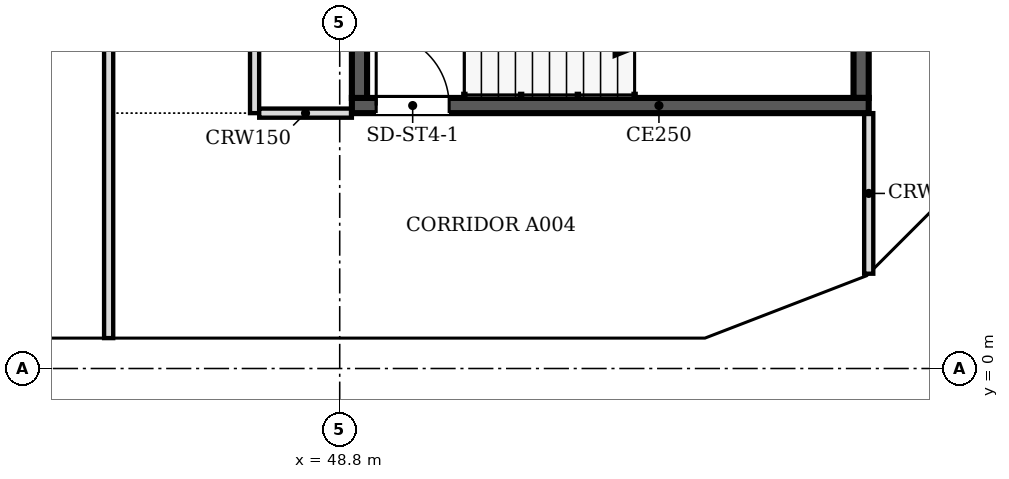
"""IFC4 building model, lengths in metres.
Left out: names, types, materials, properties, quantities, classifications, styles, units other than length and angle.
Written with IfcOpenShell. Run it as: python <this file> out.ifc"""

import sys

from ifc_helpers import new_model, si_unit, direction, frame, frame_2d, origin, place, context, subcontext, project, spatial, polyline, rectangle, outline, extrude, faceted_brep, source, transform, mapped, element, fill, save


model = new_model("IFC4")
c1 = context("Model", 3, precision=1e-05, world=origin(), true_north=direction((0.0, 1.0)))
c2 = subcontext(c1, "Body", "Model", "MODEL_VIEW")
j1 = project(units=[si_unit("LENGTHUNIT", "METRE"), si_unit("PLANEANGLEUNIT", "RADIAN")], contexts=[c1])
p1 = place(None, origin())
s1 = spatial("IfcSite", under=j1, at=p1, CompositionType="ELEMENT")
p2 = place(p1, origin())
s2 = spatial("IfcBuilding", under=s1, at=p2, CompositionType="ELEMENT")
p3 = place(p2, frame((0.0, 0.0, 197.9)))
s3 = spatial("IfcBuildingStorey", under=s2, at=p3, CompositionType="ELEMENT", Elevation=197.9)
m1 = source(origin(), c2, "Body", "SweptSolid", [
    extrude(outline(polyline([(6.1, 0.0), (3.05, 3.8), (0.0, 0.0), (6.1, 0.0)])), frame((0.0, 0.25, 0.0), z_axis=(0.0, -1.0, 0.0), x_axis=(1.0, 0.0, 0.0)), (0.0, 0.0, 1.0), 0.5),
])
p4 = place(p3, frame((39.65, 0.25, 0.0), z_axis=(0.0, 0.0, 1.0), x_axis=(1.0, 0.0, 0.0)))
e1 = element("IfcWall", 1, at=p4, inside=s3, PredefinedType="SOLIDWALL", context=c2, shape_type="MappedRepresentation", body=[
    mapped(m1, transform((0.0, 0.0, 0.0), scale=1.0)),
])
m2 = source(origin(), c2, "Body", "SweptSolid", [
    extrude(outline(polyline([(5.579, 0.25), (3.05, 3.401), (0.521, 0.25), (5.579, 0.25)])), frame((0.0, 0.26, 0.0), z_axis=(0.0, -1.0, 0.0), x_axis=(1.0, 0.0, 0.0)), (0.0, 0.0, 1.0), 0.52),
])
p5 = place(p4, origin())
e2 = element("IfcOpeningElement", 2, at=p5, cuts=e1, PredefinedType="OPENING", context=c2, shape_type="MappedRepresentation", body=[
    mapped(m2, transform((0.0, 0.0, 0.0), scale=1.0)),
])
p6 = place(p3, frame((45.75, 0.25, 0.0), z_axis=(0.0, 0.0, 1.0), x_axis=(1.0, 0.0, 0.0)))
e3 = element("IfcWall", 3, at=p6, inside=s3, PredefinedType="SOLIDWALL", context=c2, shape_type="MappedRepresentation", body=[
    mapped(m1, transform((0.0, 0.0, 0.0), scale=1.0)),
])
p7 = place(p6, origin())
e4 = element("IfcOpeningElement", 4, at=p7, cuts=e3, PredefinedType="OPENING", context=c2, shape_type="MappedRepresentation", body=[
    mapped(m2, transform((0.0, 0.0, 0.0), scale=1.0)),
])
m3 = source(origin(), c2, "Body", "Brep", [
    faceted_brep([(3.05, -0.25, 3.74), (3.003, -0.25, 3.8), (0.0, -0.25, 0.0), (3.05, -0.25, 0.0), (0.0, 0.25, 0.0), (2.957, 0.25, 3.741), (2.957, 0.25, 0.0), (3.003, 0.0, 3.8)], [[[0, 1, 2, 3]], [[4, 5, 6]], [[7, 1, 0]], [[5, 4, 2, 1, 7]], [[4, 6, 3, 2]], [[3, 6, 5, 7, 0]]]),
])
p8 = place(p3, frame((51.85, 0.25, 0.0), z_axis=(0.0, 0.0, 1.0), x_axis=(1.0, 0.0, 0.0)))
e5 = element("IfcWall", 5, at=p8, inside=s3, PredefinedType="SOLIDWALL", context=c2, shape_type="MappedRepresentation", body=[
    mapped(m3, transform((0.0, 0.0, 0.0), scale=1.0)),
])
m4 = source(origin(), c2, "Body", "SweptSolid", [
    extrude(outline(polyline([(2.803, 3.144), (0.516, 0.25), (2.803, 0.25), (2.803, 3.144)])), frame((0.0, 0.26, 0.0), z_axis=(0.0, -1.0, 0.0), x_axis=(1.0, 0.0, 0.0)), (0.0, 0.0, 1.0), 0.52),
])
p9 = place(p8, origin())
e6 = element("IfcOpeningElement", 6, at=p9, cuts=e5, PredefinedType="OPENING", context=c2, shape_type="MappedRepresentation", body=[
    mapped(m4, transform((0.0, 0.0, 0.0), scale=1.0)),
])
m5 = source(origin(), c2, "Body", "Brep", [
    faceted_brep([(2.997, -0.25, 0.0), (0.047, -0.25, 3.8), (0.0, -0.25, 3.741), (0.0, -0.25, 0.0), (0.093, 0.25, 3.74), (2.944, 0.25, 0.068), (2.944, 0.25, 0.0), (0.093, 0.25, 0.0), (0.047, 0.0, 3.8), (2.997, 0.0, 0.0)], [[[0, 1, 2, 3]], [[4, 5, 6, 7]], [[5, 4, 8, 1, 0, 9]], [[2, 1, 8]], [[7, 6, 9, 0, 3]], [[7, 3, 2, 8, 4]], [[9, 6, 5]]]),
])
p10 = place(p3, frame((54.81, 0.233, 0.0), z_axis=(0.0, 0.0, 1.0), x_axis=(0.932990326376, 0.359901446078, 0.0)))
e7 = element("IfcWall", 7, at=p10, inside=s3, PredefinedType="SOLIDWALL", context=c2, shape_type="MappedRepresentation", body=[
    mapped(m5, transform((0.0, 0.0, 0.0), scale=1.0)),
])
m6 = source(origin(), c2, "Body", "SweptSolid", [
    extrude(outline(polyline([(2.487, 0.25), (0.247, 3.135), (0.247, 0.25), (2.487, 0.25)])), frame((0.0, 0.26, 0.0), z_axis=(0.0, -1.0, 0.0), x_axis=(1.0, 0.0, 0.0)), (0.0, 0.0, 1.0), 0.52),
])
p11 = place(p10, origin())
e8 = element("IfcOpeningElement", 8, at=p11, cuts=e7, PredefinedType="OPENING", context=c2, shape_type="MappedRepresentation", body=[
    mapped(m6, transform((0.0, 0.0, 0.0), scale=1.0)),
])
m7 = source(origin(), c2, "Body", "Brep", [
    faceted_brep([(2.997, -0.25, 3.732), (2.944, -0.25, 3.8), (0.0, -0.25, 0.0), (2.997, -0.25, 0.0), (0.053, 0.25, 0.068), (2.891, 0.25, 3.732), (2.891, 0.25, 0.0), (0.053, 0.25, 0.0), (2.944, 0.0, 3.8), (0.0, 0.0, 0.0)], [[[0, 1, 2, 3]], [[4, 5, 6, 7]], [[8, 1, 0]], [[5, 4, 9, 2, 1, 8]], [[7, 6, 3, 2, 9]], [[7, 9, 4]], [[3, 6, 5, 8, 0]]]),
])
p12 = place(p3, frame((57.606, 1.312, 0.0), z_axis=(0.0, 0.0, 1.0), x_axis=(0.707147509625, 0.707066050402, 0.0)))
e9 = element("IfcWall", 9, at=p12, inside=s3, PredefinedType="SOLIDWALL", context=c2, shape_type="MappedRepresentation", body=[
    mapped(m7, transform((0.0, 0.0, 0.0), scale=1.0)),
])
m8 = source(origin(), c2, "Body", "SweptSolid", [
    extrude(outline(polyline([(2.744, 3.134), (0.51, 0.25), (2.744, 0.25), (2.744, 3.134)])), frame((0.0, 0.26, 0.0), z_axis=(0.0, -1.0, 0.0), x_axis=(1.0, 0.0, 0.0)), (0.0, 0.0, 1.0), 0.52),
])
p13 = place(p12, origin())
e10 = element("IfcOpeningElement", 10, at=p13, cuts=e9, PredefinedType="OPENING", context=c2, shape_type="MappedRepresentation", body=[
    mapped(m8, transform((0.0, 0.0, 0.0), scale=1.0)),
])
p14 = place(p2, frame((0.0, 0.0, 201.7)))
s4 = spatial("IfcBuildingStorey", under=s2, at=p14, CompositionType="ELEMENT", Elevation=201.7)
m9 = source(origin(), c2, "Body", "SweptSolid", [
    extrude(outline(polyline([(3.05, 0.0), (6.1, 3.8), (3.05, 7.6), (0.0, 3.8), (3.05, 0.0)])), frame((0.0, 0.25, 0.0), z_axis=(0.0, -1.0, 0.0), x_axis=(1.0, 0.0, 0.0)), (0.0, 0.0, 1.0), 0.5),
])
p15 = place(p14, frame((42.7, 0.25, -3.8), z_axis=(0.0, 0.0, 1.0), x_axis=(1.0, 0.0, 0.0)))
e11 = element("IfcWall", 11, at=p15, inside=s4, PredefinedType="SOLIDWALL", context=c2, shape_type="MappedRepresentation", body=[
    mapped(m9, transform((0.0, 0.0, 0.0), scale=1.0)),
])
m10 = source(origin(), c2, "Body", "SweptSolid", [
    extrude(outline(polyline([(3.05, 0.399), (5.78, 3.8), (3.05, 7.201), (0.321, 3.8), (3.05, 0.399)])), frame((0.0, 0.26, 0.0), z_axis=(0.0, -1.0, 0.0), x_axis=(1.0, 0.0, 0.0)), (0.0, 0.0, 1.0), 0.52),
])
p16 = place(p15, origin())
e12 = element("IfcOpeningElement", 12, at=p16, cuts=e11, PredefinedType="OPENING", context=c2, shape_type="MappedRepresentation", body=[
    mapped(m10, transform((0.0, 0.0, 0.0), scale=1.0)),
])
m11 = source(origin(), c2, "Body", "Brep", [
    faceted_brep([(3.05, -0.25, 0.0), (6.053, -0.25, 3.8), (3.05, -0.25, 7.6), (0.0, -0.25, 3.8), (0.0, 0.25, 3.8), (3.05, 0.25, 7.6), (6.007, 0.25, 3.859), (6.007, 0.25, 3.741), (3.05, 0.25, 0.0), (6.053, 0.0, 3.8)], [[[0, 1, 2, 3]], [[4, 5, 6, 7, 8]], [[8, 7, 9, 1, 0]], [[6, 5, 2, 1, 9]], [[5, 4, 3, 2]], [[4, 8, 0, 3]], [[9, 7, 6]]]),
])
p17 = place(p14, frame((48.8, 0.25, -3.8), z_axis=(0.0, 0.0, 1.0), x_axis=(1.0, 0.0, 0.0)))
e13 = element("IfcWall", 13, at=p17, inside=s4, PredefinedType="SOLIDWALL", context=c2, shape_type="MappedRepresentation", body=[
    mapped(m11, transform((0.0, 0.0, 0.0), scale=1.0)),
])
m12 = source(origin(), c2, "Body", "SweptSolid", [
    extrude(outline(polyline([(3.049, 0.401), (5.735, 3.8), (3.049, 7.199), (0.321, 3.8), (3.049, 0.401)])), frame((0.0, 0.26, 0.0), z_axis=(0.0, -1.0, 0.0), x_axis=(1.0, 0.0, 0.0)), (0.0, 0.0, 1.0), 0.52),
])
p18 = place(p17, origin())
e14 = element("IfcOpeningElement", 14, at=p18, cuts=e13, PredefinedType="OPENING", context=c2, shape_type="MappedRepresentation", body=[
    mapped(m12, transform((0.0, 0.0, 0.0), scale=1.0)),
])
m13 = source(origin(), c2, "Body", "Brep", [
    faceted_brep([(2.95, -0.25, 0.0), (3.003, -0.25, 0.068), (3.003, -0.25, 7.532), (2.95, -0.25, 7.6), (0.0, -0.25, 3.8), (0.047, 0.25, 3.86), (2.898, 0.25, 7.532), (2.898, 0.25, 0.068), (0.047, 0.25, 3.74), (2.95, 0.0, 0.0), (2.95, 0.0, 7.6), (0.0, 0.0, 3.8)], [[[0, 1, 2, 3, 4]], [[5, 6, 7, 8]], [[1, 0, 9]], [[10, 3, 2]], [[6, 5, 11, 4, 3, 10]], [[8, 7, 9, 0, 4, 11]], [[8, 11, 5]], [[1, 9, 7, 6, 10, 2]]]),
])
p19 = place(p14, frame((54.854, 0.25, -3.8), z_axis=(0.0, 0.0, 1.0), x_axis=(0.932970071518, 0.359953949349, 0.0)))
e15 = element("IfcWall", 15, at=p19, inside=s4, PredefinedType="SOLIDWALL", context=c2, shape_type="MappedRepresentation", body=[
    mapped(m13, transform((0.0, 0.0, 0.0), scale=1.0)),
])
m14 = source(origin(), c2, "Body", "SweptSolid", [
    extrude(outline(polyline([(2.75, 6.935), (0.316, 3.8), (2.75, 0.665), (2.75, 6.935)])), frame((0.0, 0.26, 0.0), z_axis=(0.0, -1.0, 0.0), x_axis=(1.0, 0.0, 0.0)), (0.0, 0.0, 1.0), 0.52),
])
p20 = place(p19, origin())
e16 = element("IfcOpeningElement", 16, at=p20, cuts=e15, PredefinedType="OPENING", context=c2, shape_type="MappedRepresentation", body=[
    mapped(m14, transform((0.0, 0.0, 0.0), scale=1.0)),
])
m15 = source(origin(), c2, "Body", "Brep", [
    faceted_brep([(0.053, -0.25, 0.0), (2.997, -0.25, 3.8), (0.053, -0.25, 7.6), (0.0, -0.25, 7.532), (0.0, -0.25, 0.068), (0.106, 0.25, 7.532), (2.944, 0.25, 3.868), (2.944, 0.25, 3.732), (0.106, 0.25, 0.068), (2.997, 0.0, 3.8), (0.053, 0.0, 0.0), (0.053, 0.0, 7.6)], [[[0, 1, 2, 3, 4]], [[5, 6, 7, 8]], [[8, 7, 9, 1, 0, 10]], [[6, 5, 11, 2, 1, 9]], [[3, 2, 11]], [[10, 0, 4]], [[8, 10, 4, 3, 11, 5]], [[9, 7, 6]]]),
])
p21 = place(p14, frame((57.569, 1.274, -3.8), z_axis=(0.0, 0.0, 1.0), x_axis=(0.707066050402, 0.707147509625, 0.0)))
e17 = element("IfcWall", 17, at=p21, inside=s4, PredefinedType="SOLIDWALL", context=c2, shape_type="MappedRepresentation", body=[
    mapped(m15, transform((0.0, 0.0, 0.0), scale=1.0)),
])
m16 = source(origin(), c2, "Body", "SweptSolid", [
    extrude(outline(polyline([(0.253, 0.667), (2.681, 3.8), (0.253, 6.934), (0.253, 0.667)])), frame((0.0, 0.26, 0.0), z_axis=(0.0, -1.0, 0.0), x_axis=(1.0, 0.0, 0.0)), (0.0, 0.0, 1.0), 0.52),
])
p22 = place(p21, origin())
e18 = element("IfcOpeningElement", 18, at=p22, cuts=e17, PredefinedType="OPENING", context=c2, shape_type="MappedRepresentation", body=[
    mapped(m16, transform((0.0, 0.0, 0.0), scale=1.0)),
])
p23 = place(p3, frame((57.5, 4.325, 0.0), z_axis=(0.0, 0.0, 1.0), x_axis=(-1.0, 0.0, 0.0)))
e19 = element("IfcWall", 19, at=p23, inside=s3, PredefinedType="SOLIDWALL", context=c2, shape_type="SweptSolid", body=[
    extrude(rectangle(XDim=8.5, YDim=0.25, at=frame_2d((4.25, 0.0))), origin(), (0.0, 0.0, 1.0), 3.8),
])
m17 = source(origin(), c2, "Body", "SweptSolid", [
    extrude(rectangle(XDim=1.2, YDim=2.1, at=frame_2d((0.6, 1.05))), frame((0.0, 0.135, 0.0), z_axis=(0.0, -1.0, 0.0), x_axis=(1.0, 0.0, 0.0)), (0.0, 0.0, 1.0), 0.27),
])
p24 = place(p23, frame((6.9, 0.0, 0.0)))
e20 = element("IfcOpeningElement", 20, at=p24, cuts=e19, PredefinedType="OPENING", context=c2, shape_type="MappedRepresentation", body=[
    mapped(m17, transform((0.0, 0.0, 0.0), scale=1.0)),
])
for number, where, z_axis, x_axis in (
    (21, (49.125, 4.45, 0.0), (0.0, 0.0, 1.0), (0.0, 1.0, 0.0)),
    (22, (57.375, 7.85, 0.0), (0.0, 0.0, 1.0), (0.0, -1.0, 0.0)),
):
    element("IfcWall", number, at=place(p3, frame(where, z_axis=z_axis, x_axis=x_axis)), inside=s3, PredefinedType="SOLIDWALL", context=c2, shape_type="SweptSolid", body=[
        extrude(rectangle(XDim=3.4, YDim=0.25, at=frame_2d((1.7, 0.0))), origin(), (0.0, 0.0, 1.0), 3.8),
    ])
p25 = place(p3, frame((45.0, 0.5, 0.0), z_axis=(0.0, 0.0, 1.0), x_axis=(0.0, 1.0, 0.0)))
e23 = element("IfcWall", 23, at=p25, inside=s3, PredefinedType="PARTITIONING", context=c2, shape_type="SweptSolid", body=[
    extrude(rectangle(XDim=21.724, YDim=0.15, at=frame_2d((10.862, 0.0))), origin(), (0.0, 0.0, 1.0), 3.067),
])
m18 = source(origin(), c2, "Body", "SweptSolid", [
    extrude(rectangle(XDim=0.9, YDim=2.1, at=frame_2d((0.45, 1.05))), frame((0.0, 0.085, 0.0), z_axis=(0.0, -1.0, 0.0), x_axis=(1.0, 0.0, 0.0)), (0.0, 0.0, 1.0), 0.17),
])
p26 = place(p25, frame((7.7, 0.0, 0.0)))
e24 = element("IfcOpeningElement", 24, at=p26, cuts=e23, PredefinedType="OPENING", context=c2, shape_type="MappedRepresentation", body=[
    mapped(m18, transform((0.0, 0.0, 0.0), scale=1.0)),
])
p27 = place(p25, frame((16.8, 0.0, 0.0)))
e25 = element("IfcOpeningElement", 25, at=p27, cuts=e23, PredefinedType="OPENING", context=c2, shape_type="MappedRepresentation", body=[
    mapped(m18, transform((0.0, 0.0, 0.0), scale=1.0)),
])
p28 = place(p3, frame((57.5, 1.559, 0.0), z_axis=(0.0, 0.0, 1.0), x_axis=(0.0, 1.0, 0.0)))
e26 = element("IfcWall", 26, at=p28, inside=s3, PredefinedType="PARTITIONING", context=c2, shape_type="SweptSolid", body=[
    extrude(rectangle(XDim=2.641, YDim=0.15, at=frame_2d((1.32, 0.0))), origin(), (0.0, 0.0, 1.0), 3.067),
])
p29 = place(p3, frame((47.4, 22.3, 0.0), z_axis=(0.0, 0.0, 1.0), x_axis=(0.0, -1.0, 0.0)))
e27 = element("IfcWall", 27, at=p29, inside=s3, PredefinedType="PARTITIONING", context=c2, shape_type="SweptSolid", body=[
    extrude(rectangle(XDim=18.1, YDim=0.15, at=frame_2d((9.05, 0.0))), origin(), (0.0, 0.0, 1.0), 3.067),
])
m19 = source(origin(), c2, "Body", "SweptSolid", [
    extrude(rectangle(XDim=1.0, YDim=2.1, at=frame_2d((0.5, 1.05))), frame((0.0, 0.085, 0.0), z_axis=(0.0, -1.0, 0.0), x_axis=(1.0, 0.0, 0.0)), (0.0, 0.0, 1.0), 0.17),
])
p30 = place(p29, frame((3.599, 0.0, 0.0)))
e28 = element("IfcOpeningElement", 28, at=p30, cuts=e27, PredefinedType="OPENING", context=c2, shape_type="MappedRepresentation", body=[
    mapped(m19, transform((0.0, 0.0, 0.0), scale=1.0)),
])
p31 = place(p29, frame((12.7, 0.0, 0.0)))
e29 = element("IfcOpeningElement", 29, at=p31, cuts=e27, PredefinedType="OPENING", context=c2, shape_type="MappedRepresentation", body=[
    mapped(m19, transform((0.0, 0.0, 0.0), scale=1.0)),
])
p32 = place(p3, frame((47.476, 4.2, 0.0), z_axis=(0.0, 0.0, 1.0), x_axis=(1.0, 0.0, 0.0)))
e30 = element("IfcWall", 30, at=p32, inside=s3, PredefinedType="PARTITIONING", context=c2, shape_type="SweptSolid", body=[
    extrude(rectangle(XDim=1.524, YDim=0.15, at=frame_2d((0.762, 0.0))), origin(), (0.0, 0.0, 1.0), 3.067),
])
m20 = source(origin(), c2, "Body", "SweptSolid", [
    extrude(rectangle(XDim=1.2, YDim=2.1, at=frame_2d((0.6, 1.05))), frame((0.0, 0.025, 0.0), z_axis=(0.0, -1.0, 0.0), x_axis=(1.0, 0.0, 0.0)), (0.0, 0.0, 1.0), 0.05),
])
p33 = place(p24, origin())
e31 = element("IfcDoor", 31, at=p33, inside=s3, OperationType="SINGLE_SWING_RIGHT", PredefinedType="DOOR", context=c2, shape_type="MappedRepresentation", body=[
    mapped(m20, transform((0.0, 0.0, 0.0), scale=1.0)),
])
fill(e20, e31)
save(model, sys.argv[1])
